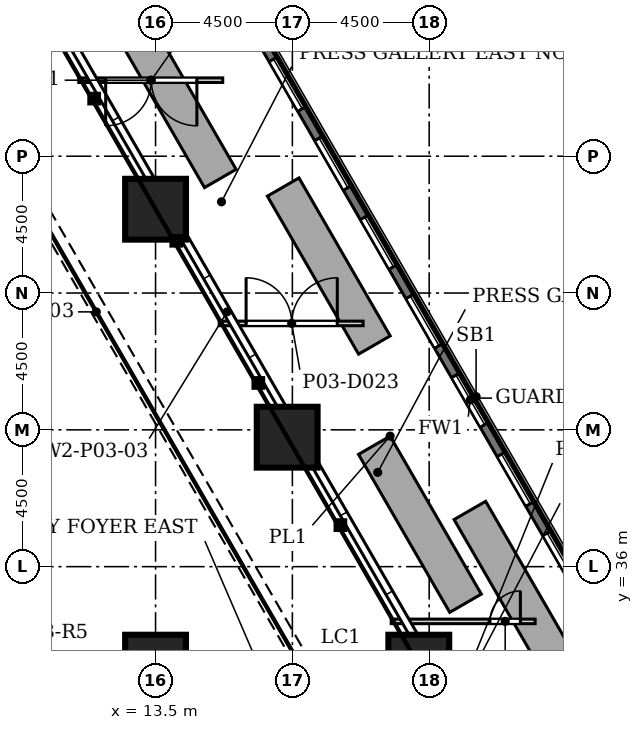
"""IFC4 building model, lengths in metres.
Left out: names, types, materials, properties, quantities, classifications, styles, units other than length and angle.
Written with IfcOpenShell. Run it as: python <this file> out.ifc"""

import sys

from ifc_helpers import new_model, si_unit, direction, frame, frame_2d, origin, origin_2d, place, context, subcontext, project, spatial, polyline, rectangle, hollow_rectangle, outline, extrude, element, fill, save


model = new_model("IFC4")
c1 = context("Model", 3, precision=1e-05, world=origin(), true_north=direction((0.0, 1.0)))
c2 = subcontext(c1, "Body", "Model", "MODEL_VIEW")
j1 = project(units=[si_unit("LENGTHUNIT", "METRE"), si_unit("PLANEANGLEUNIT", "RADIAN")], contexts=[c1])
p1 = place(None, origin())
s1 = spatial("IfcSite", under=j1, at=p1, CompositionType="ELEMENT")
p2 = place(p1, origin())
s2 = spatial("IfcBuilding", under=s1, at=p2, CompositionType="ELEMENT")
p3 = place(p2, frame((0.0, 0.0, 20.0)))
s3 = spatial("IfcBuildingStorey", under=s2, at=p3, CompositionType="ELEMENT", Elevation=20.0)
for number, where, z_axis, x_axis in (
    (1, (22.158, 32.76, 0.0), (0.0, 0.0, 1.0), (1.0, 0.0, 0.0)),
    (2, (13.5, 47.756, 0.0), (0.0, 0.0, 1.0), (1.0, 0.0, 0.0)),
    (3, (13.5, 32.76, 0.0), (0.0, 0.0, 1.0), (1.0, 0.0, 0.0)),
    (4, (17.829, 40.258, 0.0), (0.0, 0.0, 1.0), (1.0, 0.0, 0.0)),
):
    element("IfcColumn", number, at=place(p3, frame(where, z_axis=z_axis, x_axis=x_axis)), inside=s3, PredefinedType="COLUMN", context=c2, shape_type="SweptSolid", body=[
        extrude(rectangle(XDim=2.0, YDim=2.0, at=origin_2d()), origin(), (0.0, 0.0, 1.0), 5.0),
    ])
p4 = place(p3, frame((42.853, 8.575, 0.0), z_axis=(0.0, 0.0, 1.0), x_axis=(-0.49999894854, 0.866026010844, 0.0)))
e5 = element("IfcWall", 5, at=p4, inside=s3, PredefinedType="SOLIDWALL", context=c2, shape_type="SweptSolid", body=[
    extrude(rectangle(XDim=76.0, YDim=0.34, at=frame_2d((38.0, 0.0))), origin(), (0.0, 0.0, 1.0), 3.0),
])
p5 = place(p4, frame((1.058, 0.0, 0.9)))
e6 = element("IfcOpeningElement", 6, at=p5, cuts=e5, PredefinedType="OPENING", context=c2, shape_type="SweptSolid", body=[
    extrude(rectangle(XDim=1.885, YDim=1.9, at=frame_2d((0.942, 0.95))), frame((0.0, 0.18, 0.0), z_axis=(0.0, -1.0, 0.0), x_axis=(1.0, 0.0, 0.0)), (0.0, 0.0, 1.0), 0.36),
])
p6 = place(p4, frame((4.058, 0.0, 0.9)))
e7 = element("IfcOpeningElement", 7, at=p6, cuts=e5, PredefinedType="OPENING", context=c2, shape_type="SweptSolid", body=[
    extrude(rectangle(XDim=1.885, YDim=1.9, at=frame_2d((0.942, 0.95))), frame((0.0, 0.18, 0.0), z_axis=(0.0, -1.0, 0.0), x_axis=(1.0, 0.0, 0.0)), (0.0, 0.0, 1.0), 0.36),
])
p7 = place(p4, frame((7.058, 0.0, 0.9)))
e8 = element("IfcOpeningElement", 8, at=p7, cuts=e5, PredefinedType="OPENING", context=c2, shape_type="SweptSolid", body=[
    extrude(rectangle(XDim=1.885, YDim=1.9, at=frame_2d((0.942, 0.95))), frame((0.0, 0.18, 0.0), z_axis=(0.0, -1.0, 0.0), x_axis=(1.0, 0.0, 0.0)), (0.0, 0.0, 1.0), 0.36),
])
p8 = place(p4, frame((10.058, 0.0, 0.9)))
e9 = element("IfcOpeningElement", 9, at=p8, cuts=e5, PredefinedType="OPENING", context=c2, shape_type="SweptSolid", body=[
    extrude(rectangle(XDim=1.885, YDim=1.9, at=frame_2d((0.942, 0.95))), frame((0.0, 0.18, 0.0), z_axis=(0.0, -1.0, 0.0), x_axis=(1.0, 0.0, 0.0)), (0.0, 0.0, 1.0), 0.36),
])
p9 = place(p4, frame((13.058, 0.0, 0.9)))
e10 = element("IfcOpeningElement", 10, at=p9, cuts=e5, PredefinedType="OPENING", context=c2, shape_type="SweptSolid", body=[
    extrude(rectangle(XDim=1.885, YDim=1.9, at=frame_2d((0.942, 0.95))), frame((0.0, 0.18, 0.0), z_axis=(0.0, -1.0, 0.0), x_axis=(1.0, 0.0, 0.0)), (0.0, 0.0, 1.0), 0.36),
])
p10 = place(p4, frame((16.058, 0.0, 0.9)))
e11 = element("IfcOpeningElement", 11, at=p10, cuts=e5, PredefinedType="OPENING", context=c2, shape_type="SweptSolid", body=[
    extrude(rectangle(XDim=1.885, YDim=1.9, at=frame_2d((0.942, 0.95))), frame((0.0, 0.18, 0.0), z_axis=(0.0, -1.0, 0.0), x_axis=(1.0, 0.0, 0.0)), (0.0, 0.0, 1.0), 0.36),
])
p11 = place(p4, frame((19.058, 0.0, 0.9)))
e12 = element("IfcOpeningElement", 12, at=p11, cuts=e5, PredefinedType="OPENING", context=c2, shape_type="SweptSolid", body=[
    extrude(rectangle(XDim=1.885, YDim=1.9, at=frame_2d((0.942, 0.95))), frame((0.0, 0.18, 0.0), z_axis=(0.0, -1.0, 0.0), x_axis=(1.0, 0.0, 0.0)), (0.0, 0.0, 1.0), 0.36),
])
p12 = place(p4, frame((22.058, 0.0, 0.9)))
e13 = element("IfcOpeningElement", 13, at=p12, cuts=e5, PredefinedType="OPENING", context=c2, shape_type="SweptSolid", body=[
    extrude(rectangle(XDim=1.885, YDim=1.9, at=frame_2d((0.942, 0.95))), frame((0.0, 0.18, 0.0), z_axis=(0.0, -1.0, 0.0), x_axis=(1.0, 0.0, 0.0)), (0.0, 0.0, 1.0), 0.36),
])
p13 = place(p4, frame((25.058, 0.0, 0.9)))
e14 = element("IfcOpeningElement", 14, at=p13, cuts=e5, PredefinedType="OPENING", context=c2, shape_type="SweptSolid", body=[
    extrude(rectangle(XDim=1.885, YDim=1.9, at=frame_2d((0.942, 0.95))), frame((0.0, 0.18, 0.0), z_axis=(0.0, -1.0, 0.0), x_axis=(1.0, 0.0, 0.0)), (0.0, 0.0, 1.0), 0.36),
])
p14 = place(p4, frame((28.058, 0.0, 0.9)))
e15 = element("IfcOpeningElement", 15, at=p14, cuts=e5, PredefinedType="OPENING", context=c2, shape_type="SweptSolid", body=[
    extrude(rectangle(XDim=1.885, YDim=1.9, at=frame_2d((0.942, 0.95))), frame((0.0, 0.18, 0.0), z_axis=(0.0, -1.0, 0.0), x_axis=(1.0, 0.0, 0.0)), (0.0, 0.0, 1.0), 0.36),
])
p15 = place(p4, frame((31.058, 0.0, 0.9)))
e16 = element("IfcOpeningElement", 16, at=p15, cuts=e5, PredefinedType="OPENING", context=c2, shape_type="SweptSolid", body=[
    extrude(rectangle(XDim=1.885, YDim=1.9, at=frame_2d((0.942, 0.95))), frame((0.0, 0.18, 0.0), z_axis=(0.0, -1.0, 0.0), x_axis=(1.0, 0.0, 0.0)), (0.0, 0.0, 1.0), 0.36),
])
p16 = place(p4, frame((34.058, 0.0, 0.9)))
e17 = element("IfcOpeningElement", 17, at=p16, cuts=e5, PredefinedType="OPENING", context=c2, shape_type="SweptSolid", body=[
    extrude(rectangle(XDim=1.885, YDim=1.9, at=frame_2d((0.942, 0.95))), frame((0.0, 0.18, 0.0), z_axis=(0.0, -1.0, 0.0), x_axis=(1.0, 0.0, 0.0)), (0.0, 0.0, 1.0), 0.36),
])
p17 = place(p4, frame((37.058, 0.0, 0.9)))
e18 = element("IfcOpeningElement", 18, at=p17, cuts=e5, PredefinedType="OPENING", context=c2, shape_type="SweptSolid", body=[
    extrude(rectangle(XDim=1.885, YDim=1.9, at=frame_2d((0.942, 0.95))), frame((0.0, 0.18, 0.0), z_axis=(0.0, -1.0, 0.0), x_axis=(1.0, 0.0, 0.0)), (0.0, 0.0, 1.0), 0.36),
])
p18 = place(p4, frame((40.058, 0.0, 0.9)))
e19 = element("IfcOpeningElement", 19, at=p18, cuts=e5, PredefinedType="OPENING", context=c2, shape_type="SweptSolid", body=[
    extrude(rectangle(XDim=1.885, YDim=1.9, at=frame_2d((0.942, 0.95))), frame((0.0, 0.18, 0.0), z_axis=(0.0, -1.0, 0.0), x_axis=(1.0, 0.0, 0.0)), (0.0, 0.0, 1.0), 0.36),
])
p19 = place(p4, frame((43.058, 0.0, 0.9)))
e20 = element("IfcOpeningElement", 20, at=p19, cuts=e5, PredefinedType="OPENING", context=c2, shape_type="SweptSolid", body=[
    extrude(rectangle(XDim=1.885, YDim=1.9, at=frame_2d((0.942, 0.95))), frame((0.0, 0.18, 0.0), z_axis=(0.0, -1.0, 0.0), x_axis=(1.0, 0.0, 0.0)), (0.0, 0.0, 1.0), 0.36),
])
p20 = place(p4, frame((46.058, 0.0, 0.9)))
e21 = element("IfcOpeningElement", 21, at=p20, cuts=e5, PredefinedType="OPENING", context=c2, shape_type="SweptSolid", body=[
    extrude(rectangle(XDim=1.885, YDim=1.9, at=frame_2d((0.942, 0.95))), frame((0.0, 0.18, 0.0), z_axis=(0.0, -1.0, 0.0), x_axis=(1.0, 0.0, 0.0)), (0.0, 0.0, 1.0), 0.36),
])
p21 = place(p4, frame((49.058, 0.0, 0.9)))
e22 = element("IfcOpeningElement", 22, at=p21, cuts=e5, PredefinedType="OPENING", context=c2, shape_type="SweptSolid", body=[
    extrude(rectangle(XDim=1.885, YDim=1.9, at=frame_2d((0.942, 0.95))), frame((0.0, 0.18, 0.0), z_axis=(0.0, -1.0, 0.0), x_axis=(1.0, 0.0, 0.0)), (0.0, 0.0, 1.0), 0.36),
])
p22 = place(p4, frame((52.058, 0.0, 0.9)))
e23 = element("IfcOpeningElement", 23, at=p22, cuts=e5, PredefinedType="OPENING", context=c2, shape_type="SweptSolid", body=[
    extrude(rectangle(XDim=1.885, YDim=1.9, at=frame_2d((0.942, 0.95))), frame((0.0, 0.18, 0.0), z_axis=(0.0, -1.0, 0.0), x_axis=(1.0, 0.0, 0.0)), (0.0, 0.0, 1.0), 0.36),
])
p23 = place(p4, frame((55.058, 0.0, 0.9)))
e24 = element("IfcOpeningElement", 24, at=p23, cuts=e5, PredefinedType="OPENING", context=c2, shape_type="SweptSolid", body=[
    extrude(rectangle(XDim=1.885, YDim=1.9, at=frame_2d((0.942, 0.95))), frame((0.0, 0.18, 0.0), z_axis=(0.0, -1.0, 0.0), x_axis=(1.0, 0.0, 0.0)), (0.0, 0.0, 1.0), 0.36),
])
p24 = place(p4, frame((58.058, 0.0, 0.9)))
e25 = element("IfcOpeningElement", 25, at=p24, cuts=e5, PredefinedType="OPENING", context=c2, shape_type="SweptSolid", body=[
    extrude(rectangle(XDim=1.885, YDim=1.9, at=frame_2d((0.942, 0.95))), frame((0.0, 0.18, 0.0), z_axis=(0.0, -1.0, 0.0), x_axis=(1.0, 0.0, 0.0)), (0.0, 0.0, 1.0), 0.36),
])
p25 = place(p4, frame((61.058, 0.0, 0.9)))
e26 = element("IfcOpeningElement", 26, at=p25, cuts=e5, PredefinedType="OPENING", context=c2, shape_type="SweptSolid", body=[
    extrude(rectangle(XDim=1.885, YDim=1.9, at=frame_2d((0.942, 0.95))), frame((0.0, 0.18, 0.0), z_axis=(0.0, -1.0, 0.0), x_axis=(1.0, 0.0, 0.0)), (0.0, 0.0, 1.0), 0.36),
])
p26 = place(p4, frame((64.058, 0.0, 0.9)))
e27 = element("IfcOpeningElement", 27, at=p26, cuts=e5, PredefinedType="OPENING", context=c2, shape_type="SweptSolid", body=[
    extrude(rectangle(XDim=1.885, YDim=1.9, at=frame_2d((0.942, 0.95))), frame((0.0, 0.18, 0.0), z_axis=(0.0, -1.0, 0.0), x_axis=(1.0, 0.0, 0.0)), (0.0, 0.0, 1.0), 0.36),
])
p27 = place(p4, frame((67.058, 0.0, 0.9)))
e28 = element("IfcOpeningElement", 28, at=p27, cuts=e5, PredefinedType="OPENING", context=c2, shape_type="SweptSolid", body=[
    extrude(rectangle(XDim=1.885, YDim=1.9, at=frame_2d((0.942, 0.95))), frame((0.0, 0.18, 0.0), z_axis=(0.0, -1.0, 0.0), x_axis=(1.0, 0.0, 0.0)), (0.0, 0.0, 1.0), 0.36),
])
p28 = place(p4, frame((70.058, 0.0, 0.9)))
e29 = element("IfcOpeningElement", 29, at=p28, cuts=e5, PredefinedType="OPENING", context=c2, shape_type="SweptSolid", body=[
    extrude(rectangle(XDim=1.885, YDim=1.9, at=frame_2d((0.942, 0.95))), frame((0.0, 0.18, 0.0), z_axis=(0.0, -1.0, 0.0), x_axis=(1.0, 0.0, 0.0)), (0.0, 0.0, 1.0), 0.36),
])
p29 = place(p4, frame((73.058, 0.0, 0.9)))
e30 = element("IfcOpeningElement", 30, at=p29, cuts=e5, PredefinedType="OPENING", context=c2, shape_type="SweptSolid", body=[
    extrude(rectangle(XDim=1.885, YDim=1.9, at=frame_2d((0.942, 0.95))), frame((0.0, 0.18, 0.0), z_axis=(0.0, -1.0, 0.0), x_axis=(1.0, 0.0, 0.0)), (0.0, 0.0, 1.0), 0.36),
])
p30 = place(p3, frame((0.0, 0.0, 5.0)))
e31 = element("IfcWall", 31, at=p30, inside=s3, PredefinedType="USERDEFINED", context=c2, shape_type="SweptSolid", body=[
    extrude(outline(polyline([(18.217, 48.785), (17.178, 48.186), (20.178, 42.989), (21.217, 43.589), (18.217, 48.785)])), origin(), (0.0, 0.0, 1.0), 1.1),
])
p31 = place(p3, frame((0.0, 0.0, 5.0)))
e32 = element("IfcWall", 32, at=p31, inside=s3, PredefinedType="USERDEFINED", context=c2, shape_type="SweptSolid", body=[
    extrude(outline(polyline([(24.358, 38.149), (23.319, 37.549), (26.319, 32.353), (27.358, 32.953), (24.358, 38.149)])), origin(), (0.0, 0.0, 1.0), 1.1),
])
p32 = place(p3, frame((0.0, 0.0, 5.0)))
e33 = element("IfcWall", 33, at=p32, inside=s3, PredefinedType="USERDEFINED", context=c2, shape_type="SweptSolid", body=[
    extrude(outline(polyline([(23.176, 34.497), (24.215, 35.097), (21.215, 40.293), (20.176, 39.693), (23.176, 34.497)])), origin(), (0.0, 0.0, 1.0), 1.1),
])
p33 = place(p3, frame((0.0, 0.0, 5.0)))
e34 = element("IfcWall", 34, at=p33, inside=s3, PredefinedType="USERDEFINED", context=c2, shape_type="SweptSolid", body=[
    extrude(outline(polyline([(15.11, 48.467), (16.149, 49.067), (13.149, 54.263), (12.11, 53.663), (15.11, 48.467)])), origin(), (0.0, 0.0, 1.0), 1.1),
])
for number, where, z_axis, x_axis in (
    (35, (19.579, 37.366, 5.0), (0.0, 0.0, 1.0), (1.0, 0.0, 0.0)),
    (36, (16.88, 42.042, 5.0), (0.0, 0.0, 1.0), (1.0, 0.0, 0.0)),
    (37, (14.18, 46.718, 5.0), (0.0, 0.0, 1.0), (1.0, 0.0, 0.0)),
    (38, (11.48, 51.394, 5.0), (0.0, 0.0, 1.0), (1.0, 0.0, 0.0)),
):
    element("IfcColumn", number, at=place(p3, frame(where, z_axis=z_axis, x_axis=x_axis)), inside=s3, PredefinedType="COLUMN", context=c2, shape_type="SweptSolid", body=[
        extrude(hollow_rectangle(XDim=0.25, YDim=0.25, WallThickness=0.012, at=origin_2d()), origin(), (0.0, 0.0, 1.0), 3.6),
    ])
p34 = place(p3, frame((21.251, 34.2, 0.0), z_axis=(0.0, 0.0, 1.0), x_axis=(1.0, 0.0, 0.0)))
e39 = element("IfcWall", 39, at=p34, inside=s3, PredefinedType="PARTITIONING", context=c2, shape_type="SweptSolid", body=[
    extrude(rectangle(XDim=4.734, YDim=0.15, at=frame_2d((2.367, 0.0))), origin(), (0.0, 0.0, 1.0), 3.0),
])
p35 = place(p34, frame((3.249, 0.0, 0.0)))
e40 = element("IfcOpeningElement", 40, at=p35, cuts=e39, PredefinedType="OPENING", context=c2, shape_type="SweptSolid", body=[
    extrude(rectangle(XDim=1.0, YDim=2.1, at=frame_2d((0.5, 1.05))), frame((0.0, 0.085, 0.0), z_axis=(0.0, -1.0, 0.0), x_axis=(1.0, 0.0, 0.0)), (0.0, 0.0, 1.0), 0.17),
])
p36 = place(p3, frame((15.594, 44.0, 0.0), z_axis=(0.0, 0.0, 1.0), x_axis=(1.0, 0.0, 0.0)))
e41 = element("IfcWall", 41, at=p36, inside=s3, PredefinedType="PARTITIONING", context=c2, shape_type="SweptSolid", body=[
    extrude(rectangle(XDim=4.734, YDim=0.15, at=frame_2d((2.367, 0.0))), origin(), (0.0, 0.0, 1.0), 3.0),
])
p37 = place(p36, frame((0.885, 0.0, 0.0)))
e42 = element("IfcOpeningElement", 42, at=p37, cuts=e41, PredefinedType="OPENING", context=c2, shape_type="SweptSolid", body=[
    extrude(rectangle(XDim=3.0, YDim=2.4, at=frame_2d((1.5, 1.2))), frame((0.0, 0.085, 0.0), z_axis=(0.0, -1.0, 0.0), x_axis=(1.0, 0.0, 0.0)), (0.0, 0.0, 1.0), 0.17),
])
p38 = place(p3, frame((10.975, 52.0, 0.0), z_axis=(0.0, 0.0, 1.0), x_axis=(1.0, 0.0, 0.0)))
e43 = element("IfcWall", 43, at=p38, inside=s3, PredefinedType="PARTITIONING", context=c2, shape_type="SweptSolid", body=[
    extrude(rectangle(XDim=4.734, YDim=0.15, at=frame_2d((2.367, 0.0))), origin(), (0.0, 0.0, 1.0), 3.0),
])
p39 = place(p38, frame((0.885, 0.0, 0.0)))
e44 = element("IfcOpeningElement", 44, at=p39, cuts=e43, PredefinedType="OPENING", context=c2, shape_type="SweptSolid", body=[
    extrude(rectangle(XDim=3.0, YDim=2.4, at=frame_2d((1.5, 1.2))), frame((0.0, 0.085, 0.0), z_axis=(0.0, -1.0, 0.0), x_axis=(1.0, 0.0, 0.0)), (0.0, 0.0, 1.0), 0.17),
])
p40 = place(p15, origin())
e45 = element("IfcWindow", 45, at=p40, inside=s3, PartitioningType="SINGLE_PANEL", PredefinedType="WINDOW", context=c2, shape_type="SweptSolid", body=[
    extrude(rectangle(XDim=1.885, YDim=1.9, at=frame_2d((0.942, 0.95))), frame((0.0, 0.11, 0.0), z_axis=(0.0, -1.0, 0.0), x_axis=(1.0, 0.0, 0.0)), (0.0, 0.0, 1.0), 0.06),
])
fill(e16, e45)
p41 = place(p16, origin())
e46 = element("IfcWindow", 46, at=p41, inside=s3, PartitioningType="SINGLE_PANEL", PredefinedType="WINDOW", context=c2, shape_type="SweptSolid", body=[
    extrude(rectangle(XDim=1.885, YDim=1.9, at=frame_2d((0.942, 0.95))), frame((0.0, 0.11, 0.0), z_axis=(0.0, -1.0, 0.0), x_axis=(1.0, 0.0, 0.0)), (0.0, 0.0, 1.0), 0.06),
])
fill(e17, e46)
p42 = place(p17, origin())
e47 = element("IfcWindow", 47, at=p42, inside=s3, PartitioningType="SINGLE_PANEL", PredefinedType="WINDOW", context=c2, shape_type="SweptSolid", body=[
    extrude(rectangle(XDim=1.885, YDim=1.9, at=frame_2d((0.942, 0.95))), frame((0.0, 0.11, 0.0), z_axis=(0.0, -1.0, 0.0), x_axis=(1.0, 0.0, 0.0)), (0.0, 0.0, 1.0), 0.06),
])
fill(e18, e47)
p43 = place(p18, origin())
e48 = element("IfcWindow", 48, at=p43, inside=s3, PartitioningType="SINGLE_PANEL", PredefinedType="WINDOW", context=c2, shape_type="SweptSolid", body=[
    extrude(rectangle(XDim=1.885, YDim=1.9, at=frame_2d((0.942, 0.95))), frame((0.0, 0.11, 0.0), z_axis=(0.0, -1.0, 0.0), x_axis=(1.0, 0.0, 0.0)), (0.0, 0.0, 1.0), 0.06),
])
fill(e19, e48)
p44 = place(p19, origin())
e49 = element("IfcWindow", 49, at=p44, inside=s3, PartitioningType="SINGLE_PANEL", PredefinedType="WINDOW", context=c2, shape_type="SweptSolid", body=[
    extrude(rectangle(XDim=1.885, YDim=1.9, at=frame_2d((0.942, 0.95))), frame((0.0, 0.11, 0.0), z_axis=(0.0, -1.0, 0.0), x_axis=(1.0, 0.0, 0.0)), (0.0, 0.0, 1.0), 0.06),
])
fill(e20, e49)
p45 = place(p20, origin())
e50 = element("IfcWindow", 50, at=p45, inside=s3, PartitioningType="SINGLE_PANEL", PredefinedType="WINDOW", context=c2, shape_type="SweptSolid", body=[
    extrude(rectangle(XDim=1.885, YDim=1.9, at=frame_2d((0.942, 0.95))), frame((0.0, 0.11, 0.0), z_axis=(0.0, -1.0, 0.0), x_axis=(1.0, 0.0, 0.0)), (0.0, 0.0, 1.0), 0.06),
])
fill(e21, e50)
p46 = place(p21, origin())
e51 = element("IfcWindow", 51, at=p46, inside=s3, PartitioningType="SINGLE_PANEL", PredefinedType="WINDOW", context=c2, shape_type="SweptSolid", body=[
    extrude(rectangle(XDim=1.885, YDim=1.9, at=frame_2d((0.942, 0.95))), frame((0.0, 0.11, 0.0), z_axis=(0.0, -1.0, 0.0), x_axis=(1.0, 0.0, 0.0)), (0.0, 0.0, 1.0), 0.06),
])
fill(e22, e51)
p47 = place(p37, origin())
e52 = element("IfcDoor", 52, at=p47, inside=s3, OperationType="DOUBLE_DOOR_SINGLE_SWING", PredefinedType="DOOR", context=c2, shape_type="SweptSolid", body=[
    extrude(rectangle(XDim=3.0, YDim=2.4, at=frame_2d((1.5, 1.2))), frame((0.0, 0.025, 0.0), z_axis=(0.0, -1.0, 0.0), x_axis=(1.0, 0.0, 0.0)), (0.0, 0.0, 1.0), 0.05),
])
fill(e42, e52)
p48 = place(p39, frame((3.0, 0.0, 0.0), z_axis=(0.0, 0.0, 1.0), x_axis=(-1.0, 0.0, 0.0)))
e53 = element("IfcDoor", 53, at=p48, inside=s3, OperationType="DOUBLE_DOOR_SINGLE_SWING", PredefinedType="DOOR", context=c2, shape_type="SweptSolid", body=[
    extrude(rectangle(XDim=3.0, YDim=2.4, at=frame_2d((1.5, 1.2))), frame((0.0, 0.025, 0.0), z_axis=(0.0, -1.0, 0.0), x_axis=(1.0, 0.0, 0.0)), (0.0, 0.0, 1.0), 0.05),
])
fill(e44, e53)
p49 = place(p35, origin())
e54 = element("IfcDoor", 54, at=p49, inside=s3, OperationType="SINGLE_SWING_RIGHT", PredefinedType="DOOR", context=c2, shape_type="SweptSolid", body=[
    extrude(rectangle(XDim=1.0, YDim=2.1, at=frame_2d((0.5, 1.05))), frame((0.0, 0.025, 0.0), z_axis=(0.0, -1.0, 0.0), x_axis=(1.0, 0.0, 0.0)), (0.0, 0.0, 1.0), 0.05),
])
fill(e40, e54)
save(model, sys.argv[1])
